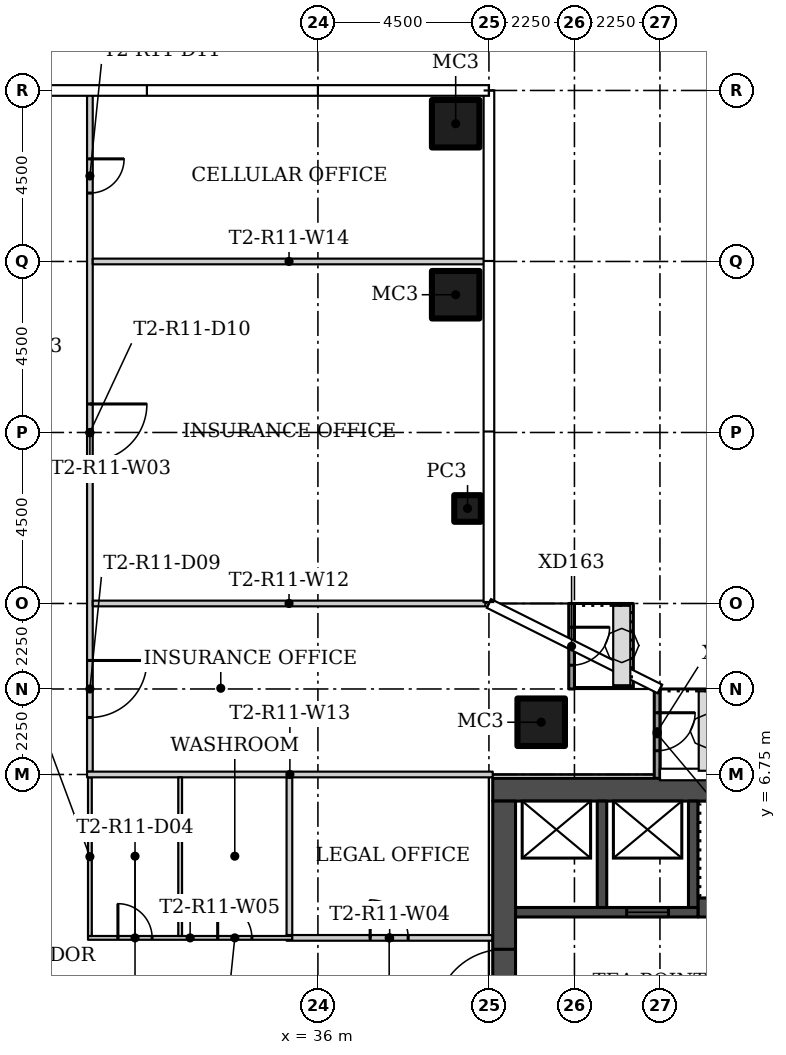
"""IFC4 building model, lengths in metres.
Left out: names, types, materials, properties, quantities, classifications, styles, units other than length and angle.
Written with IfcOpenShell. Run it as: python <this file> out.ifc"""

import sys

from ifc_helpers import new_model, si_unit, direction, frame, frame_2d, origin, origin_2d, place, context, subcontext, project, spatial, rectangle, hollow_rectangle, extrude, element, fill, save


model = new_model("IFC4")
c1 = context("Model", 3, precision=1e-05, world=origin(), true_north=direction((0.0, 1.0)))
c2 = subcontext(c1, "Body", "Model", "MODEL_VIEW")
j1 = project(units=[si_unit("LENGTHUNIT", "METRE"), si_unit("PLANEANGLEUNIT", "RADIAN")], contexts=[c1])
p1 = place(None, origin())
s1 = spatial("IfcSite", under=j1, at=p1, CompositionType="ELEMENT")
p2 = place(p1, origin())
s2 = spatial("IfcBuilding", under=s1, at=p2, CompositionType="ELEMENT")
p3 = place(p2, frame((0.0, 0.0, 109.2)))
s3 = spatial("IfcBuildingStorey", under=s2, at=p3, CompositionType="ELEMENT", Elevation=109.2)
p4 = place(p3, frame((41.875, 8.125, 0.0)))
e1 = element("IfcColumn", 1, at=p4, inside=s3, PredefinedType="COLUMN", context=c2, shape_type="SweptSolid", body=[
    extrude(hollow_rectangle(XDim=1.25, YDim=1.25, WallThickness=0.05, at=origin_2d()), origin(), (0.0, 0.0, 1.0), 3.55),
])
p5 = place(p3, frame((39.938, 13.75, 0.0)))
e2 = element("IfcColumn", 2, at=p5, inside=s3, PredefinedType="COLUMN", context=c2, shape_type="SweptSolid", body=[
    extrude(hollow_rectangle(XDim=0.7, YDim=0.7, WallThickness=0.025, at=origin_2d()), origin(), (0.0, 0.0, 1.0), 3.55),
])
for number, where in (
    (3, (39.625, 19.375, 0.0)),
    (4, (39.625, 23.875, 0.0)),
):
    element("IfcColumn", number, at=place(p3, frame(where)), inside=s3, PredefinedType="COLUMN", context=c2, shape_type="SweptSolid", body=[
        extrude(hollow_rectangle(XDim=1.25, YDim=1.25, WallThickness=0.05, at=origin_2d()), origin(), (0.0, 0.0, 1.0), 3.55),
    ])
p6 = place(p3, frame((30.0, 24.655, 0.0), z_axis=(0.0, 0.0, 1.0), x_axis=(0.0, -1.0, 0.0)))
e5 = element("IfcWall", 5, at=p6, inside=s3, PredefinedType="PARTITIONING", context=c2, shape_type="SweptSolid", body=[
    extrude(rectangle(XDim=17.83, YDim=0.15, at=frame_2d((8.915, 0.0))), origin(), (0.0, 0.0, 1.0), 3.55),
])
p7 = place(p6, frame((14.905, 0.0, 0.0)))
e6 = element("IfcOpeningElement", 6, at=p7, cuts=e5, PredefinedType="OPENING", context=c2, shape_type="SweptSolid", body=[
    extrude(rectangle(XDim=1.5, YDim=2.1, at=frame_2d((0.75, 1.05))), frame((0.0, 0.085, 0.0), z_axis=(0.0, -1.0, 0.0), x_axis=(1.0, 0.0, 0.0)), (0.0, 0.0, 1.0), 0.17),
])
p8 = place(p6, frame((8.155, 0.0, 0.0)))
e7 = element("IfcOpeningElement", 7, at=p8, cuts=e5, PredefinedType="OPENING", context=c2, shape_type="SweptSolid", body=[
    extrude(rectangle(XDim=1.5, YDim=2.1, at=frame_2d((0.75, 1.05))), frame((0.0, 0.085, 0.0), z_axis=(0.0, -1.0, 0.0), x_axis=(1.0, 0.0, 0.0)), (0.0, 0.0, 1.0), 0.17),
])
p9 = place(p6, frame((1.705, 0.0, 0.0)))
e8 = element("IfcOpeningElement", 8, at=p9, cuts=e5, PredefinedType="OPENING", context=c2, shape_type="SweptSolid", body=[
    extrude(rectangle(XDim=0.9, YDim=2.1, at=frame_2d((0.45, 1.05))), frame((0.0, 0.085, 0.0), z_axis=(0.0, -1.0, 0.0), x_axis=(1.0, 0.0, 0.0)), (0.0, 0.0, 1.0), 0.17),
])
p10 = place(p3, frame((35.175, 2.45, 0.0)))
e9 = element("IfcWall", 9, at=p10, inside=s3, PredefinedType="PARTITIONING", context=c2, shape_type="SweptSolid", body=[
    extrude(rectangle(XDim=5.425, YDim=0.15, at=frame_2d((2.712, 0.0))), origin(), (0.0, 0.0, 1.0), 3.55),
])
p11 = place(p10, frame((2.2, 0.0, 0.0)))
e10 = element("IfcOpeningElement", 10, at=p11, cuts=e9, PredefinedType="OPENING", context=c2, shape_type="SweptSolid", body=[
    extrude(rectangle(XDim=1.0, YDim=2.4, at=frame_2d((0.5, 1.2))), frame((0.0, 0.085, 0.0), z_axis=(0.0, -1.0, 0.0), x_axis=(1.0, 0.0, 0.0)), (0.0, 0.0, 1.0), 0.17),
])
p12 = place(p3, frame((29.95, 2.45, 0.0)))
e11 = element("IfcWall", 11, at=p12, inside=s3, PredefinedType="PARTITIONING", context=c2, shape_type="SweptSolid", body=[
    extrude(rectangle(XDim=5.375, YDim=0.1, at=frame_2d((2.688, 0.0))), origin(), (0.0, 0.0, 1.0), 3.55),
])
p13 = place(p12, frame((3.413, 0.0, 0.0)))
e12 = element("IfcOpeningElement", 12, at=p13, cuts=e11, PredefinedType="OPENING", context=c2, shape_type="SweptSolid", body=[
    extrude(rectangle(XDim=0.9, YDim=2.1, at=frame_2d((0.45, 1.05))), frame((0.0, 0.06, 0.0), z_axis=(0.0, -1.0, 0.0), x_axis=(1.0, 0.0, 0.0)), (0.0, 0.0, 1.0), 0.12),
])
p14 = place(p12, frame((0.788, 0.0, 0.0)))
e13 = element("IfcOpeningElement", 13, at=p14, cuts=e11, PredefinedType="OPENING", context=c2, shape_type="SweptSolid", body=[
    extrude(rectangle(XDim=0.9, YDim=2.1, at=frame_2d((0.45, 1.05))), frame((0.0, 0.06, 0.0), z_axis=(0.0, -1.0, 0.0), x_axis=(1.0, 0.0, 0.0)), (0.0, 0.0, 1.0), 0.12),
])
p15 = place(p3, frame((30.0, 6.675, 0.0), z_axis=(0.0, 0.0, 1.0), x_axis=(0.0, -1.0, 0.0)))
e14 = element("IfcWall", 14, at=p15, inside=s3, PredefinedType="PARTITIONING", context=c2, shape_type="SweptSolid", body=[
    extrude(rectangle(XDim=4.175, YDim=0.1, at=frame_2d((2.087, 0.0))), origin(), (0.0, 0.0, 1.0), 3.55),
])
p16 = place(p3, frame((40.405, 11.25, 0.0), z_axis=(0.0, 0.0, 1.0), x_axis=(-1.0, 0.0, 0.0)))
e15 = element("IfcWall", 15, at=p16, inside=s3, PredefinedType="PARTITIONING", context=c2, shape_type="SweptSolid", body=[
    extrude(rectangle(XDim=10.33, YDim=0.15, at=frame_2d((5.165, 0.0))), origin(), (0.0, 0.0, 1.0), 3.55),
])
p17 = place(p3, frame((29.925, 6.75, 0.0)))
e16 = element("IfcWall", 16, at=p17, inside=s3, PredefinedType="PARTITIONING", context=c2, shape_type="SweptSolid", body=[
    extrude(rectangle(XDim=10.675, YDim=0.15, at=frame_2d((5.337, 0.0))), origin(), (0.0, 0.0, 1.0), 3.55),
])
p18 = place(p3, frame((40.405, 20.25, 0.0), z_axis=(0.0, 0.0, 1.0), x_axis=(-1.0, 0.0, 0.0)))
e17 = element("IfcWall", 17, at=p18, inside=s3, PredefinedType="PARTITIONING", context=c2, shape_type="SweptSolid", body=[
    extrude(rectangle(XDim=10.33, YDim=0.15, at=frame_2d((5.165, 0.0))), origin(), (0.0, 0.0, 1.0), 3.55),
])
p19 = place(p3, frame((35.25, 6.675, 0.0), z_axis=(0.0, 0.0, 1.0), x_axis=(0.0, -1.0, 0.0)))
e18 = element("IfcWall", 18, at=p19, inside=s3, PredefinedType="PARTITIONING", context=c2, shape_type="SweptSolid", body=[
    extrude(rectangle(XDim=4.15, YDim=0.15, at=frame_2d((2.075, 0.0))), origin(), (0.0, 0.0, 1.0), 3.55),
])
p20 = place(p3, frame((32.375, 6.675, 0.0), z_axis=(0.0, 0.0, 1.0), x_axis=(0.0, -1.0, 0.0)))
e19 = element("IfcWall", 19, at=p20, inside=s3, PredefinedType="PARTITIONING", context=c2, shape_type="SweptSolid", body=[
    extrude(rectangle(XDim=4.175, YDim=0.1, at=frame_2d((2.087, 0.0))), origin(), (0.0, 0.0, 1.0), 3.55),
])
p21 = place(p3, frame((42.675, 11.25, 0.0), z_axis=(0.0, 0.0, 1.0), x_axis=(0.0, -1.0, 0.0)))
e20 = element("IfcWall", 20, at=p21, inside=s3, PredefinedType="SOLIDWALL", context=c2, shape_type="SweptSolid", body=[
    extrude(rectangle(XDim=2.25, YDim=0.15, at=frame_2d((1.125, 0.0))), origin(), (0.0, 0.0, 1.0), 3.45),
])
p22 = place(p21, frame((0.625, 0.0, 0.0)))
e21 = element("IfcOpeningElement", 21, at=p22, cuts=e20, PredefinedType="OPENING", context=c2, shape_type="SweptSolid", body=[
    extrude(rectangle(XDim=1.0, YDim=2.4, at=frame_2d((0.5, 1.2))), frame((0.0, 0.085, 0.0), z_axis=(0.0, -1.0, 0.0), x_axis=(1.0, 0.0, 0.0)), (0.0, 0.0, 1.0), 0.17),
])
p23 = place(p3, frame((44.925, 9.0, 0.0), z_axis=(0.0, 0.0, 1.0), x_axis=(0.0, -1.0, 0.0)))
e22 = element("IfcWall", 22, at=p23, inside=s3, PredefinedType="SOLIDWALL", context=c2, shape_type="SweptSolid", body=[
    extrude(rectangle(XDim=2.357, YDim=0.15, at=frame_2d((1.178, 0.0))), origin(), (0.0, 0.0, 1.0), 3.45),
])
p24 = place(p23, frame((0.625, 0.0, 0.0)))
e23 = element("IfcOpeningElement", 23, at=p24, cuts=e22, PredefinedType="OPENING", context=c2, shape_type="SweptSolid", body=[
    extrude(rectangle(XDim=1.0, YDim=2.4, at=frame_2d((0.5, 1.2))), frame((0.0, 0.085, 0.0), z_axis=(0.0, -1.0, 0.0), x_axis=(1.0, 0.0, 0.0)), (0.0, 0.0, 1.0), 0.17),
])
p25 = place(p3, frame((53.9, 6.35, 0.0), z_axis=(0.0, 0.0, 1.0), x_axis=(-1.0, 0.0, 0.0)))
e24 = element("IfcWall", 24, at=p25, inside=s3, PredefinedType="SHEAR", context=c2, shape_type="SweptSolid", body=[
    extrude(rectangle(XDim=13.3, YDim=0.6, at=frame_2d((6.65, 0.0))), origin(), (0.0, 0.0, 1.0), 3.55),
])
p26 = place(p3, frame((40.9, -6.05, 0.0), z_axis=(0.0, 0.0, 1.0), x_axis=(0.0, 1.0, 0.0)))
e25 = element("IfcWall", 25, at=p26, inside=s3, PredefinedType="SHEAR", context=c2, shape_type="SweptSolid", body=[
    extrude(rectangle(XDim=12.1, YDim=0.6, at=frame_2d((6.05, 0.0))), origin(), (0.0, 0.0, 1.0), 3.55),
])
p27 = place(p26, frame((0.8, 0.0, 0.0)))
e26 = element("IfcOpeningElement", 26, at=p27, cuts=e25, PredefinedType="OPENING", context=c2, shape_type="SweptSolid", body=[
    extrude(rectangle(XDim=1.2, YDim=2.1, at=frame_2d((0.6, 1.05))), frame((0.0, 0.31, 0.0), z_axis=(0.0, -1.0, 0.0), x_axis=(1.0, 0.0, 0.0)), (0.0, 0.0, 1.0), 0.62),
])
p28 = place(p26, frame((6.4, 0.0, 0.0)))
e27 = element("IfcOpeningElement", 27, at=p28, cuts=e25, PredefinedType="OPENING", context=c2, shape_type="SweptSolid", body=[
    extrude(rectangle(XDim=1.8, YDim=2.4, at=frame_2d((0.9, 1.2))), frame((0.0, 0.31, 0.0), z_axis=(0.0, -1.0, 0.0), x_axis=(1.0, 0.0, 0.0)), (0.0, 0.0, 1.0), 0.62),
])
p29 = place(p3, frame((46.0, 3.25, 0.0)))
e28 = element("IfcWall", 28, at=p29, inside=s3, PredefinedType="SHEAR", context=c2, shape_type="SweptSolid", body=[
    extrude(rectangle(XDim=7.3, YDim=0.5, at=frame_2d((3.65, 0.0))), origin(), (0.0, 0.0, 1.0), 3.55),
])
p30 = place(p29, frame((6.15, 0.0, 0.0)))
e29 = element("IfcOpeningElement", 29, at=p30, cuts=e28, PredefinedType="OPENING", context=c2, shape_type="SweptSolid", body=[
    extrude(rectangle(XDim=1.1, YDim=2.1, at=frame_2d((0.55, 1.05))), frame((0.0, 0.26, 0.0), z_axis=(0.0, -1.0, 0.0), x_axis=(1.0, 0.0, 0.0)), (0.0, 0.0, 1.0), 0.52),
])
p31 = place(p3, frame((46.0, 3.125, 0.0), z_axis=(0.0, 0.0, 1.0), x_axis=(-1.0, 0.0, 0.0)))
e30 = element("IfcWall", 30, at=p31, inside=s3, PredefinedType="SHEAR", context=c2, shape_type="SweptSolid", body=[
    extrude(rectangle(XDim=4.8, YDim=0.25, at=frame_2d((2.4, 0.0))), origin(), (0.0, 0.0, 1.0), 3.55),
])
p32 = place(p31, frame((0.775, 0.0, 0.0)))
e31 = element("IfcOpeningElement", 31, at=p32, cuts=e30, PredefinedType="OPENING", context=c2, shape_type="SweptSolid", body=[
    extrude(rectangle(XDim=1.1, YDim=2.1, at=frame_2d((0.55, 1.05))), frame((0.0, 0.135, 0.0), z_axis=(0.0, -1.0, 0.0), x_axis=(1.0, 0.0, 0.0)), (0.0, 0.0, 1.0), 0.27),
])
for number, where, z_axis, x_axis in (
    (32, (45.875, 3.25, 0.0), (0.0, 0.0, 1.0), (0.0, 1.0, 0.0)),
    (33, (43.475, 3.25, 0.0), (0.0, 0.0, 1.0), (0.0, 1.0, 0.0)),
):
    element("IfcWall", number, at=place(p3, frame(where, z_axis=z_axis, x_axis=x_axis)), inside=s3, PredefinedType="SHEAR", context=c2, shape_type="SweptSolid", body=[
        extrude(rectangle(XDim=2.8, YDim=0.25, at=frame_2d((1.4, 0.0))), origin(), (0.0, 0.0, 1.0), 3.55),
    ])
p33 = place(p11, origin())
e34 = element("IfcDoor", 34, at=p33, inside=s3, OperationType="SINGLE_SWING_LEFT", PredefinedType="DOOR", context=c2, shape_type="SweptSolid", body=[
    extrude(rectangle(XDim=1.0, YDim=2.4, at=frame_2d((0.5, 1.2))), frame((0.0, 0.025, 0.0), z_axis=(0.0, -1.0, 0.0), x_axis=(1.0, 0.0, 0.0)), (0.0, 0.0, 1.0), 0.05),
])
fill(e10, e34)
p34 = place(p13, origin())
e35 = element("IfcDoor", 35, at=p34, inside=s3, OperationType="SINGLE_SWING_RIGHT", PredefinedType="DOOR", context=c2, shape_type="SweptSolid", body=[
    extrude(rectangle(XDim=0.9, YDim=2.1, at=frame_2d((0.45, 1.05))), frame((0.0, 0.025, 0.0), z_axis=(0.0, -1.0, 0.0), x_axis=(1.0, 0.0, 0.0)), (0.0, 0.0, 1.0), 0.05),
])
fill(e12, e35)
p35 = place(p14, origin())
e36 = element("IfcDoor", 36, at=p35, inside=s3, OperationType="SINGLE_SWING_LEFT", PredefinedType="DOOR", context=c2, shape_type="SweptSolid", body=[
    extrude(rectangle(XDim=0.9, YDim=2.1, at=frame_2d((0.45, 1.05))), frame((0.0, 0.025, 0.0), z_axis=(0.0, -1.0, 0.0), x_axis=(1.0, 0.0, 0.0)), (0.0, 0.0, 1.0), 0.05),
])
fill(e13, e36)
p36 = place(p7, origin())
e37 = element("IfcDoor", 37, at=p36, inside=s3, OperationType="DOUBLE_DOOR_SINGLE_SWING", PredefinedType="DOOR", context=c2, shape_type="SweptSolid", body=[
    extrude(rectangle(XDim=1.5, YDim=2.1, at=frame_2d((0.75, 1.05))), frame((0.0, 0.025, 0.0), z_axis=(0.0, -1.0, 0.0), x_axis=(1.0, 0.0, 0.0)), (0.0, 0.0, 1.0), 0.05),
])
fill(e6, e37)
p37 = place(p8, origin())
e38 = element("IfcDoor", 38, at=p37, inside=s3, OperationType="DOUBLE_DOOR_SINGLE_SWING", PredefinedType="DOOR", context=c2, shape_type="SweptSolid", body=[
    extrude(rectangle(XDim=1.5, YDim=2.1, at=frame_2d((0.75, 1.05))), frame((0.0, 0.025, 0.0), z_axis=(0.0, -1.0, 0.0), x_axis=(1.0, 0.0, 0.0)), (0.0, 0.0, 1.0), 0.05),
])
fill(e7, e38)
p38 = place(p9, origin())
e39 = element("IfcDoor", 39, at=p38, inside=s3, OperationType="SINGLE_SWING_LEFT", PredefinedType="DOOR", context=c2, shape_type="SweptSolid", body=[
    extrude(rectangle(XDim=0.9, YDim=2.1, at=frame_2d((0.45, 1.05))), frame((0.0, 0.025, 0.0), z_axis=(0.0, -1.0, 0.0), x_axis=(1.0, 0.0, 0.0)), (0.0, 0.0, 1.0), 0.05),
])
fill(e8, e39)
p39 = place(p22, origin())
e40 = element("IfcDoor", 40, at=p39, inside=s3, OperationType="SINGLE_SWING_RIGHT", PredefinedType="DOOR", context=c2, shape_type="SweptSolid", body=[
    extrude(rectangle(XDim=1.0, YDim=2.4, at=frame_2d((0.5, 1.2))), frame((0.0, 0.025, 0.0), z_axis=(0.0, -1.0, 0.0), x_axis=(1.0, 0.0, 0.0)), (0.0, 0.0, 1.0), 0.05),
])
fill(e21, e40)
p40 = place(p24, origin())
e41 = element("IfcDoor", 41, at=p40, inside=s3, OperationType="SINGLE_SWING_LEFT", PredefinedType="DOOR", context=c2, shape_type="SweptSolid", body=[
    extrude(rectangle(XDim=1.0, YDim=2.4, at=frame_2d((0.5, 1.2))), frame((0.0, 0.025, 0.0), z_axis=(0.0, -1.0, 0.0), x_axis=(1.0, 0.0, 0.0)), (0.0, 0.0, 1.0), 0.05),
])
fill(e23, e41)
p41 = place(p28, origin())
e42 = element("IfcDoor", 42, at=p41, inside=s3, OperationType="DOUBLE_DOOR_SINGLE_SWING", PredefinedType="DOOR", context=c2, shape_type="SweptSolid", body=[
    extrude(rectangle(XDim=1.8, YDim=2.4, at=frame_2d((0.9, 1.2))), frame((0.0, 0.025, 0.0), z_axis=(0.0, -1.0, 0.0), x_axis=(1.0, 0.0, 0.0)), (0.0, 0.0, 1.0), 0.05),
])
fill(e27, e42)
p42 = place(p32, origin())
e43 = element("IfcDoor", 43, at=p42, inside=s3, OperationType="SLIDING_TO_LEFT", PredefinedType="DOOR", context=c2, shape_type="SweptSolid", body=[
    extrude(rectangle(XDim=1.1, YDim=2.1, at=frame_2d((0.55, 1.05))), frame((0.0, 0.025, 0.0), z_axis=(0.0, -1.0, 0.0), x_axis=(1.0, 0.0, 0.0)), (0.0, 0.0, 1.0), 0.05),
])
fill(e31, e43)
save(model, sys.argv[1])
